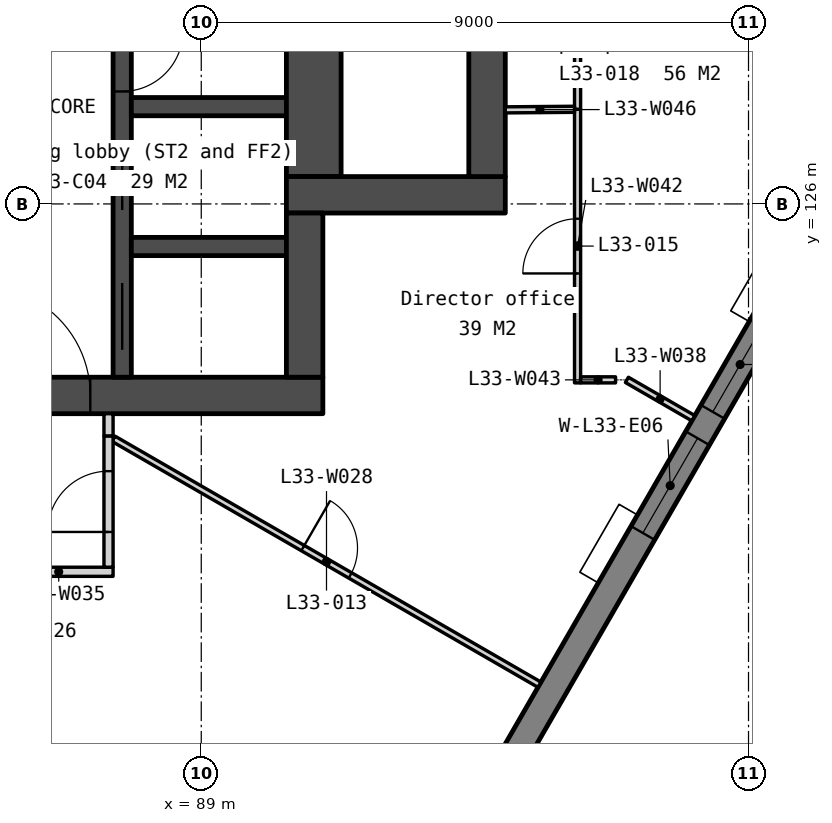
"""IFC4 building model, lengths in metres.
Left out: names, types, materials, properties, quantities, classifications, styles, units other than length and angle.
Written with IfcOpenShell. Run it as: python <this file> out.ifc"""

import sys

from ifc_helpers import new_model, si_unit, direction, frame, frame_2d, origin, place, context, subcontext, project, spatial, polyline, rectangle, outline, extrude, element, fill, save


model = new_model("IFC4")
c1 = context("Model", 3, precision=1e-05, world=origin(), true_north=direction((0.0, 1.0)))
c2 = subcontext(c1, "Body", "Model", "MODEL_VIEW")
j1 = project(units=[si_unit("LENGTHUNIT", "METRE"), si_unit("PLANEANGLEUNIT", "RADIAN")], contexts=[c1])
p1 = place(None, origin())
s1 = spatial("IfcSite", under=j1, at=p1, CompositionType="ELEMENT")
p2 = place(p1, origin())
s2 = spatial("IfcBuilding", under=s1, at=p2, CompositionType="ELEMENT")
p3 = place(p2, frame((0.0, 0.0, 132.5)))
s3 = spatial("IfcBuildingStorey", under=s2, at=p3, CompositionType="ELEMENT", Elevation=132.5)
p4 = place(p3, frame((69.0, 122.85, 0.0), z_axis=(0.0, 0.0, 1.0), x_axis=(1.0, 0.0, 0.0)))
e1 = element("IfcWall", 1, at=p4, inside=s3, PredefinedType="SOLIDWALL", context=c2, shape_type="SweptSolid", body=[
    extrude(rectangle(XDim=22.0, YDim=0.6, at=frame_2d((11.0, 0.0))), origin(), (0.0, 0.0, 1.0), 3.75),
])
p5 = place(p4, frame((16.375, 0.0, 0.0)))
e2 = element("IfcOpeningElement", 2, at=p5, cuts=e1, PredefinedType="OPENING", context=c2, shape_type="SweptSolid", body=[
    extrude(rectangle(XDim=1.8, YDim=2.1, at=frame_2d((0.9, 1.05))), frame((0.0, 0.31, 0.0), z_axis=(0.0, -1.0, 0.0), x_axis=(1.0, 0.0, 0.0)), (0.0, 0.0, 1.0), 0.62),
])
p6 = place(p4, frame((3.825, 0.0, 0.0)))
e3 = element("IfcOpeningElement", 3, at=p6, cuts=e1, PredefinedType="OPENING", context=c2, shape_type="SweptSolid", body=[
    extrude(rectangle(XDim=1.8, YDim=2.1, at=frame_2d((0.9, 1.05))), frame((0.0, 0.31, 0.0), z_axis=(0.0, -1.0, 0.0), x_axis=(1.0, 0.0, 0.0)), (0.0, 0.0, 1.0), 0.62),
])
p7 = place(p4, frame((12.85, 0.0, 0.0)))
e4 = element("IfcOpeningElement", 4, at=p7, cuts=e1, PredefinedType="OPENING", context=c2, shape_type="SweptSolid", body=[
    extrude(rectangle(XDim=1.5, YDim=2.1, at=frame_2d((0.75, 1.05))), frame((0.0, 0.31, 0.0), z_axis=(0.0, -1.0, 0.0), x_axis=(1.0, 0.0, 0.0)), (0.0, 0.0, 1.0), 0.62),
])
p8 = place(p3, frame((87.7, 133.95, 0.0), z_axis=(0.0, 0.0, 1.0), x_axis=(0.0, -1.0, 0.0)))
e5 = element("IfcWall", 5, at=p8, inside=s3, PredefinedType="SOLIDWALL", context=c2, shape_type="SweptSolid", body=[
    extrude(rectangle(XDim=10.8, YDim=0.3, at=frame_2d((5.4, 0.0))), origin(), (0.0, 0.0, 1.0), 3.75),
])
p9 = place(p8, frame((6.95, 0.0, 0.0)))
e6 = element("IfcOpeningElement", 6, at=p9, cuts=e5, PredefinedType="OPENING", context=c2, shape_type="SweptSolid", body=[
    extrude(rectangle(XDim=1.1, YDim=2.1, at=frame_2d((0.55, 1.05))), frame((0.0, 0.16, 0.0), z_axis=(0.0, -1.0, 0.0), x_axis=(1.0, 0.0, 0.0)), (0.0, 0.0, 1.0), 0.32),
])
p10 = place(p8, frame((5.1, 0.0, 0.0)))
e7 = element("IfcOpeningElement", 7, at=p10, cuts=e5, PredefinedType="OPENING", context=c2, shape_type="SweptSolid", body=[
    extrude(rectangle(XDim=1.0, YDim=2.1, at=frame_2d((0.5, 1.05))), frame((0.0, 0.16, 0.0), z_axis=(0.0, -1.0, 0.0), x_axis=(1.0, 0.0, 0.0)), (0.0, 0.0, 1.0), 0.32),
])
p11 = place(p8, frame((9.25, 0.0, 0.0)))
e8 = element("IfcOpeningElement", 8, at=p11, cuts=e5, PredefinedType="OPENING", context=c2, shape_type="SweptSolid", body=[
    extrude(rectangle(XDim=1.1, YDim=2.1, at=frame_2d((0.55, 1.05))), frame((0.0, 0.16, 0.0), z_axis=(0.0, -1.0, 0.0), x_axis=(1.0, 0.0, 0.0)), (0.0, 0.0, 1.0), 0.32),
])
for number, where, z_axis, x_axis in (
    (9, (87.85, 127.6, 0.0), (0.0, 0.0, 1.0), (1.0, 0.0, 0.0)),
    (10, (87.85, 125.3, 0.0), (0.0, 0.0, 1.0), (1.0, 0.0, 0.0)),
):
    element("IfcWall", number, at=place(p3, frame(where, z_axis=z_axis, x_axis=x_axis)), inside=s3, PredefinedType="SOLIDWALL", context=c2, shape_type="SweptSolid", body=[
        extrude(rectangle(XDim=2.55, YDim=0.3, at=frame_2d((1.275, 0.0))), origin(), (0.0, 0.0, 1.0), 3.75),
    ])
p12 = place(p3, frame((90.85, 131.35, 0.0), z_axis=(0.0, 0.0, 1.0), x_axis=(0.0, -1.0, 0.0)))
e11 = element("IfcWall", 11, at=p12, inside=s3, PredefinedType="SOLIDWALL", context=c2, shape_type="SweptSolid", body=[
    extrude(rectangle(XDim=4.9, YDim=0.9, at=frame_2d((2.45, 0.0))), origin(), (0.0, 0.0, 1.0), 3.75),
])
p13 = place(p3, frame((90.4, 126.15, 0.0), z_axis=(0.0, 0.0, 1.0), x_axis=(1.0, 0.0, 0.0)))
e12 = element("IfcWall", 12, at=p13, inside=s3, PredefinedType="SOLIDWALL", context=c2, shape_type="SweptSolid", body=[
    extrude(rectangle(XDim=3.6, YDim=0.6, at=frame_2d((1.8, 0.0))), origin(), (0.0, 0.0, 1.0), 3.75),
])
p14 = place(p3, frame((90.7, 125.85, 0.0), z_axis=(0.0, 0.0, 1.0), x_axis=(0.0, -1.0, 0.0)))
e13 = element("IfcWall", 13, at=p14, inside=s3, PredefinedType="SOLIDWALL", context=c2, shape_type="SweptSolid", body=[
    extrude(rectangle(XDim=2.7, YDim=0.6, at=frame_2d((1.35, 0.0))), origin(), (0.0, 0.0, 1.0), 3.75),
])
p15 = place(p3, frame((93.7, 131.35, 0.0), z_axis=(0.0, 0.0, 1.0), x_axis=(0.0, -1.0, 0.0)))
e14 = element("IfcWall", 14, at=p15, inside=s3, PredefinedType="SOLIDWALL", context=c2, shape_type="SweptSolid", body=[
    extrude(rectangle(XDim=4.9, YDim=0.6, at=frame_2d((2.45, 0.0))), origin(), (0.0, 0.0, 1.0), 3.75),
])
p16 = place(p3, frame((82.105, 96.067, -0.15), z_axis=(0.0, 0.0, 1.0), x_axis=(0.499997369791, 0.866026922331, 0.0)))
e15 = element("IfcWall", 15, at=p16, inside=s3, PredefinedType="SOLIDWALL", context=c2, shape_type="SweptSolid", body=[
    extrude(outline(polyline([(40.486, 0.0), (40.486, 3.9), (0.0, 3.9), (0.0, 0.0), (40.486, 0.0)])), frame((0.0, 0.225, 0.0), z_axis=(0.0, -1.0, 0.0), x_axis=(1.0, 0.0, 0.0)), (0.0, 0.0, 1.0), 0.45),
])
p17 = place(p16, frame((0.837, 0.0, 0.95)))
e16 = element("IfcOpeningElement", 16, at=p17, cuts=e15, PredefinedType="OPENING", context=c2, shape_type="SweptSolid", body=[
    extrude(rectangle(XDim=1.2, YDim=2.2, at=frame_2d((0.6, 1.1))), frame((0.0, 0.235, 0.0), z_axis=(0.0, -1.0, 0.0), x_axis=(1.0, 0.0, 0.0)), (0.0, 0.0, 1.0), 0.47),
])
p18 = place(p16, frame((8.072, 0.0, 0.95)))
e17 = element("IfcOpeningElement", 17, at=p18, cuts=e15, PredefinedType="OPENING", context=c2, shape_type="SweptSolid", body=[
    extrude(rectangle(XDim=1.8, YDim=2.2, at=frame_2d((0.9, 1.1))), frame((0.0, 0.235, 0.0), z_axis=(0.0, -1.0, 0.0), x_axis=(1.0, 0.0, 0.0)), (0.0, 0.0, 1.0), 0.47),
])
p19 = place(p16, frame((10.372, 0.0, 0.95)))
e18 = element("IfcOpeningElement", 18, at=p19, cuts=e15, PredefinedType="OPENING", context=c2, shape_type="SweptSolid", body=[
    extrude(rectangle(XDim=1.8, YDim=2.2, at=frame_2d((0.9, 1.1))), frame((0.0, 0.235, 0.0), z_axis=(0.0, -1.0, 0.0), x_axis=(1.0, 0.0, 0.0)), (0.0, 0.0, 1.0), 0.47),
])
p20 = place(p16, frame((18.193, 0.0, 0.95)))
e19 = element("IfcOpeningElement", 19, at=p20, cuts=e15, PredefinedType="OPENING", context=c2, shape_type="SweptSolid", body=[
    extrude(rectangle(XDim=1.8, YDim=2.2, at=frame_2d((0.9, 1.1))), frame((0.0, 0.235, 0.0), z_axis=(0.0, -1.0, 0.0), x_axis=(1.0, 0.0, 0.0)), (0.0, 0.0, 1.0), 0.47),
])
p21 = place(p16, frame((20.493, 0.0, 0.95)))
e20 = element("IfcOpeningElement", 20, at=p21, cuts=e15, PredefinedType="OPENING", context=c2, shape_type="SweptSolid", body=[
    extrude(rectangle(XDim=1.8, YDim=2.2, at=frame_2d((0.9, 1.1))), frame((0.0, 0.235, 0.0), z_axis=(0.0, -1.0, 0.0), x_axis=(1.0, 0.0, 0.0)), (0.0, 0.0, 1.0), 0.47),
])
p22 = place(p16, frame((28.315, 0.0, 0.95)))
e21 = element("IfcOpeningElement", 21, at=p22, cuts=e15, PredefinedType="OPENING", context=c2, shape_type="SweptSolid", body=[
    extrude(rectangle(XDim=1.8, YDim=2.2, at=frame_2d((0.9, 1.1))), frame((0.0, 0.235, 0.0), z_axis=(0.0, -1.0, 0.0), x_axis=(1.0, 0.0, 0.0)), (0.0, 0.0, 1.0), 0.47),
])
p23 = place(p16, frame((30.615, 0.0, 0.95)))
e22 = element("IfcOpeningElement", 22, at=p23, cuts=e15, PredefinedType="OPENING", context=c2, shape_type="SweptSolid", body=[
    extrude(rectangle(XDim=1.8, YDim=2.2, at=frame_2d((0.9, 1.1))), frame((0.0, 0.235, 0.0), z_axis=(0.0, -1.0, 0.0), x_axis=(1.0, 0.0, 0.0)), (0.0, 0.0, 1.0), 0.47),
])
p24 = place(p16, frame((38.449, 0.0, 0.95)))
e23 = element("IfcOpeningElement", 23, at=p24, cuts=e15, PredefinedType="OPENING", context=c2, shape_type="SweptSolid", body=[
    extrude(rectangle(XDim=1.2, YDim=2.2, at=frame_2d((0.6, 1.1))), frame((0.0, 0.235, 0.0), z_axis=(0.0, -1.0, 0.0), x_axis=(1.0, 0.0, 0.0)), (0.0, 0.0, 1.0), 0.47),
])
p25 = place(p3, frame((84.541, 118.035, 0.0), z_axis=(0.0, 0.0, 1.0), x_axis=(0.866023427642, -0.500003422764, 0.0)))
e24 = element("IfcWall", 24, at=p25, inside=s3, PredefinedType="PARTITIONING", context=c2, shape_type="SweptSolid", body=[
    extrude(rectangle(XDim=8.65, YDim=0.2, at=frame_2d((4.325, 0.0))), origin(), (0.0, 0.0, 1.0), 3.75),
])
p26 = place(p3, frame((87.557, 122.137, 0.0), z_axis=(0.0, 0.0, 1.0), x_axis=(0.866029768103, -0.499992440702, 0.0)))
e25 = element("IfcWall", 25, at=p26, inside=s3, PredefinedType="PARTITIONING", context=c2, shape_type="SweptSolid", body=[
    extrude(rectangle(XDim=8.089, YDim=0.1, at=frame_2d((4.044, 0.0))), origin(), (0.0, 0.0, 1.0), 3.75),
])
p27 = place(p26, frame((3.594, 0.0, 0.0)))
e26 = element("IfcOpeningElement", 26, at=p27, cuts=e25, PredefinedType="OPENING", context=c2, shape_type="SweptSolid", body=[
    extrude(rectangle(XDim=0.9, YDim=2.1, at=frame_2d((0.45, 1.05))), frame((0.0, 0.06, 0.0), z_axis=(0.0, -1.0, 0.0), x_axis=(1.0, 0.0, 0.0)), (0.0, 0.0, 1.0), 0.12),
])
p28 = place(p3, frame((85.762, 119.95, 0.0), z_axis=(0.0, 0.0, 1.0), x_axis=(1.0, 0.0, 0.0)))
e27 = element("IfcWall", 27, at=p28, inside=s3, PredefinedType="PARTITIONING", context=c2, shape_type="SweptSolid", body=[
    extrude(rectangle(XDim=1.788, YDim=0.15, at=frame_2d((0.894, 0.0))), origin(), (0.0, 0.0, 1.0), 3.75),
])
p29 = place(p3, frame((87.475, 120.025, 0.0), z_axis=(0.0, 0.0, 1.0), x_axis=(0.0, 1.0, 0.0)))
e28 = element("IfcWall", 28, at=p29, inside=s3, PredefinedType="PARTITIONING", context=c2, shape_type="SweptSolid", body=[
    extrude(rectangle(XDim=2.16, YDim=0.15, at=frame_2d((1.08, 0.0))), origin(), (0.0, 0.0, 1.0), 3.75),
])
p30 = place(p29, frame((0.58, 0.0, 0.0)))
e29 = element("IfcOpeningElement", 29, at=p30, cuts=e28, PredefinedType="OPENING", context=c2, shape_type="SweptSolid", body=[
    extrude(rectangle(XDim=1.0, YDim=2.1, at=frame_2d((0.5, 1.05))), frame((0.0, 0.085, 0.0), z_axis=(0.0, -1.0, 0.0), x_axis=(1.0, 0.0, 0.0)), (0.0, 0.0, 1.0), 0.17),
])
p31 = place(p3, frame((96.0, 123.106, 0.0), z_axis=(0.0, 0.0, 1.0), x_axis=(0.86607923909, -0.499906742921, 0.0)))
e30 = element("IfcWall", 30, at=p31, inside=s3, PredefinedType="PARTITIONING", context=c2, shape_type="SweptSolid", body=[
    extrude(rectangle(XDim=1.261, YDim=0.1, at=frame_2d((0.631, 0.0))), origin(), (0.0, 0.0, 1.0), 3.75),
])
p32 = place(p3, frame((87.475, 122.185, 0.0), z_axis=(0.0, 0.0, 1.0), x_axis=(0.0, 1.0, 0.0)))
e31 = element("IfcWall", 31, at=p32, inside=s3, PredefinedType="PARTITIONING", context=c2, shape_type="SweptSolid", body=[
    extrude(rectangle(XDim=0.365, YDim=0.15, at=frame_2d((0.183, 0.0))), origin(), (0.0, 0.0, 1.0), 3.75),
])
p33 = place(p3, frame((95.189, 123.057, 0.0), z_axis=(0.0, 0.0, 1.0), x_axis=(0.0, 1.0, 0.0)))
e32 = element("IfcWall", 32, at=p33, inside=s3, PredefinedType="PARTITIONING", context=c2, shape_type="SweptSolid", body=[
    extrude(rectangle(XDim=4.5, YDim=0.1, at=frame_2d((2.25, 0.0))), origin(), (0.0, 0.0, 1.0), 3.75),
])
p34 = place(p33, frame((1.8, 0.0, 0.0)))
e33 = element("IfcOpeningElement", 33, at=p34, cuts=e32, PredefinedType="OPENING", context=c2, shape_type="SweptSolid", body=[
    extrude(rectangle(XDim=0.9, YDim=2.1, at=frame_2d((0.45, 1.05))), frame((0.0, 0.06, 0.0), z_axis=(0.0, -1.0, 0.0), x_axis=(1.0, 0.0, 0.0)), (0.0, 0.0, 1.0), 0.12),
])
p35 = place(p3, frame((95.239, 123.107, 0.0), z_axis=(0.0, 0.0, 1.0), x_axis=(0.999999909769, -0.000424808798, 0.0)))
e34 = element("IfcWall", 34, at=p35, inside=s3, PredefinedType="PARTITIONING", context=c2, shape_type="SweptSolid", body=[
    extrude(rectangle(XDim=0.575, YDim=0.1, at=frame_2d((0.287, 0.0))), origin(), (0.0, 0.0, 1.0), 3.75),
])
p36 = place(p3, frame((95.189, 127.557, 0.0), z_axis=(0.0, 0.0, 1.0), x_axis=(0.0, 1.0, 0.0)))
e35 = element("IfcWall", 35, at=p36, inside=s3, PredefinedType="PARTITIONING", context=c2, shape_type="SweptSolid", body=[
    extrude(rectangle(XDim=6.993, YDim=0.1, at=frame_2d((3.497, 0.0))), origin(), (0.0, 0.0, 1.0), 3.75),
])
p37 = place(p36, frame((3.046, 0.0, 0.0)))
e36 = element("IfcOpeningElement", 36, at=p37, cuts=e35, PredefinedType="OPENING", context=c2, shape_type="SweptSolid", body=[
    extrude(rectangle(XDim=0.9, YDim=2.1, at=frame_2d((0.45, 1.05))), frame((0.0, 0.06, 0.0), z_axis=(0.0, -1.0, 0.0), x_axis=(1.0, 0.0, 0.0)), (0.0, 0.0, 1.0), 0.12),
])
p38 = place(p3, frame((94.0, 127.547, 0.0), z_axis=(0.0, 0.0, 1.0), x_axis=(0.999965040971, 0.008361628773, 0.0)))
e37 = element("IfcWall", 37, at=p38, inside=s3, PredefinedType="PARTITIONING", context=c2, shape_type="SweptSolid", body=[
    extrude(rectangle(XDim=1.139, YDim=0.1, at=frame_2d((0.569, 0.0))), origin(), (0.0, 0.0, 1.0), 3.75),
])
p39 = place(p9, origin())
e38 = element("IfcDoor", 38, at=p39, inside=s3, OperationType="SLIDING_TO_LEFT", PredefinedType="DOOR", context=c2, shape_type="SweptSolid", body=[
    extrude(rectangle(XDim=1.1, YDim=2.1, at=frame_2d((0.55, 1.05))), frame((0.0, 0.025, 0.0), z_axis=(0.0, -1.0, 0.0), x_axis=(1.0, 0.0, 0.0)), (0.0, 0.0, 1.0), 0.05),
])
fill(e6, e38)
p40 = place(p5, origin())
e39 = element("IfcDoor", 39, at=p40, inside=s3, OperationType="DOUBLE_DOOR_DOUBLE_SWING", PredefinedType="DOOR", context=c2, shape_type="SweptSolid", body=[
    extrude(rectangle(XDim=1.8, YDim=2.1, at=frame_2d((0.9, 1.05))), frame((0.0, 0.025, 0.0), z_axis=(0.0, -1.0, 0.0), x_axis=(1.0, 0.0, 0.0)), (0.0, 0.0, 1.0), 0.05),
])
fill(e2, e39)
p41 = place(p10, origin())
e40 = element("IfcDoor", 40, at=p41, inside=s3, OperationType="SINGLE_SWING_LEFT", PredefinedType="DOOR", context=c2, shape_type="SweptSolid", body=[
    extrude(rectangle(XDim=1.0, YDim=2.1, at=frame_2d((0.5, 1.05))), frame((0.0, 0.025, 0.0), z_axis=(0.0, -1.0, 0.0), x_axis=(1.0, 0.0, 0.0)), (0.0, 0.0, 1.0), 0.05),
])
fill(e7, e40)
p42 = place(p11, origin())
e41 = element("IfcDoor", 41, at=p42, inside=s3, OperationType="SLIDING_TO_LEFT", PredefinedType="DOOR", context=c2, shape_type="SweptSolid", body=[
    extrude(rectangle(XDim=1.1, YDim=2.1, at=frame_2d((0.55, 1.05))), frame((0.0, 0.025, 0.0), z_axis=(0.0, -1.0, 0.0), x_axis=(1.0, 0.0, 0.0)), (0.0, 0.0, 1.0), 0.05),
])
fill(e8, e41)
p43 = place(p22, origin())
e42 = element("IfcWindow", 42, at=p43, inside=s3, PartitioningType="SINGLE_PANEL", PredefinedType="WINDOW", context=c2, shape_type="SweptSolid", body=[
    extrude(rectangle(XDim=1.8, YDim=2.2, at=frame_2d((0.9, 1.1))), frame((0.0, 0.03, 0.0), z_axis=(0.0, -1.0, 0.0), x_axis=(1.0, 0.0, 0.0)), (0.0, 0.0, 1.0), 0.06),
])
fill(e21, e42)
p44 = place(p23, origin())
e43 = element("IfcWindow", 43, at=p44, inside=s3, PartitioningType="SINGLE_PANEL", PredefinedType="WINDOW", context=c2, shape_type="SweptSolid", body=[
    extrude(rectangle(XDim=1.8, YDim=2.2, at=frame_2d((0.9, 1.1))), frame((0.0, 0.03, 0.0), z_axis=(0.0, -1.0, 0.0), x_axis=(1.0, 0.0, 0.0)), (0.0, 0.0, 1.0), 0.06),
])
fill(e22, e43)
p45 = place(p30, origin())
e44 = element("IfcDoor", 44, at=p45, inside=s3, OperationType="SINGLE_SWING_LEFT", PredefinedType="DOOR", context=c2, shape_type="SweptSolid", body=[
    extrude(rectangle(XDim=1.0, YDim=2.1, at=frame_2d((0.5, 1.05))), frame((0.0, 0.025, 0.0), z_axis=(0.0, -1.0, 0.0), x_axis=(1.0, 0.0, 0.0)), (0.0, 0.0, 1.0), 0.05),
])
fill(e29, e44)
p46 = place(p27, origin())
e45 = element("IfcDoor", 45, at=p46, inside=s3, OperationType="SINGLE_SWING_LEFT", PredefinedType="DOOR", context=c2, shape_type="SweptSolid", body=[
    extrude(rectangle(XDim=0.9, YDim=2.1, at=frame_2d((0.45, 1.05))), frame((0.0, 0.025, 0.0), z_axis=(0.0, -1.0, 0.0), x_axis=(1.0, 0.0, 0.0)), (0.0, 0.0, 1.0), 0.05),
])
fill(e26, e45)
p47 = place(p34, origin())
e46 = element("IfcDoor", 46, at=p47, inside=s3, OperationType="SINGLE_SWING_LEFT", PredefinedType="DOOR", context=c2, shape_type="SweptSolid", body=[
    extrude(rectangle(XDim=0.9, YDim=2.1, at=frame_2d((0.45, 1.05))), frame((0.0, 0.025, 0.0), z_axis=(0.0, -1.0, 0.0), x_axis=(1.0, 0.0, 0.0)), (0.0, 0.0, 1.0), 0.05),
])
fill(e33, e46)
save(model, sys.argv[1])
